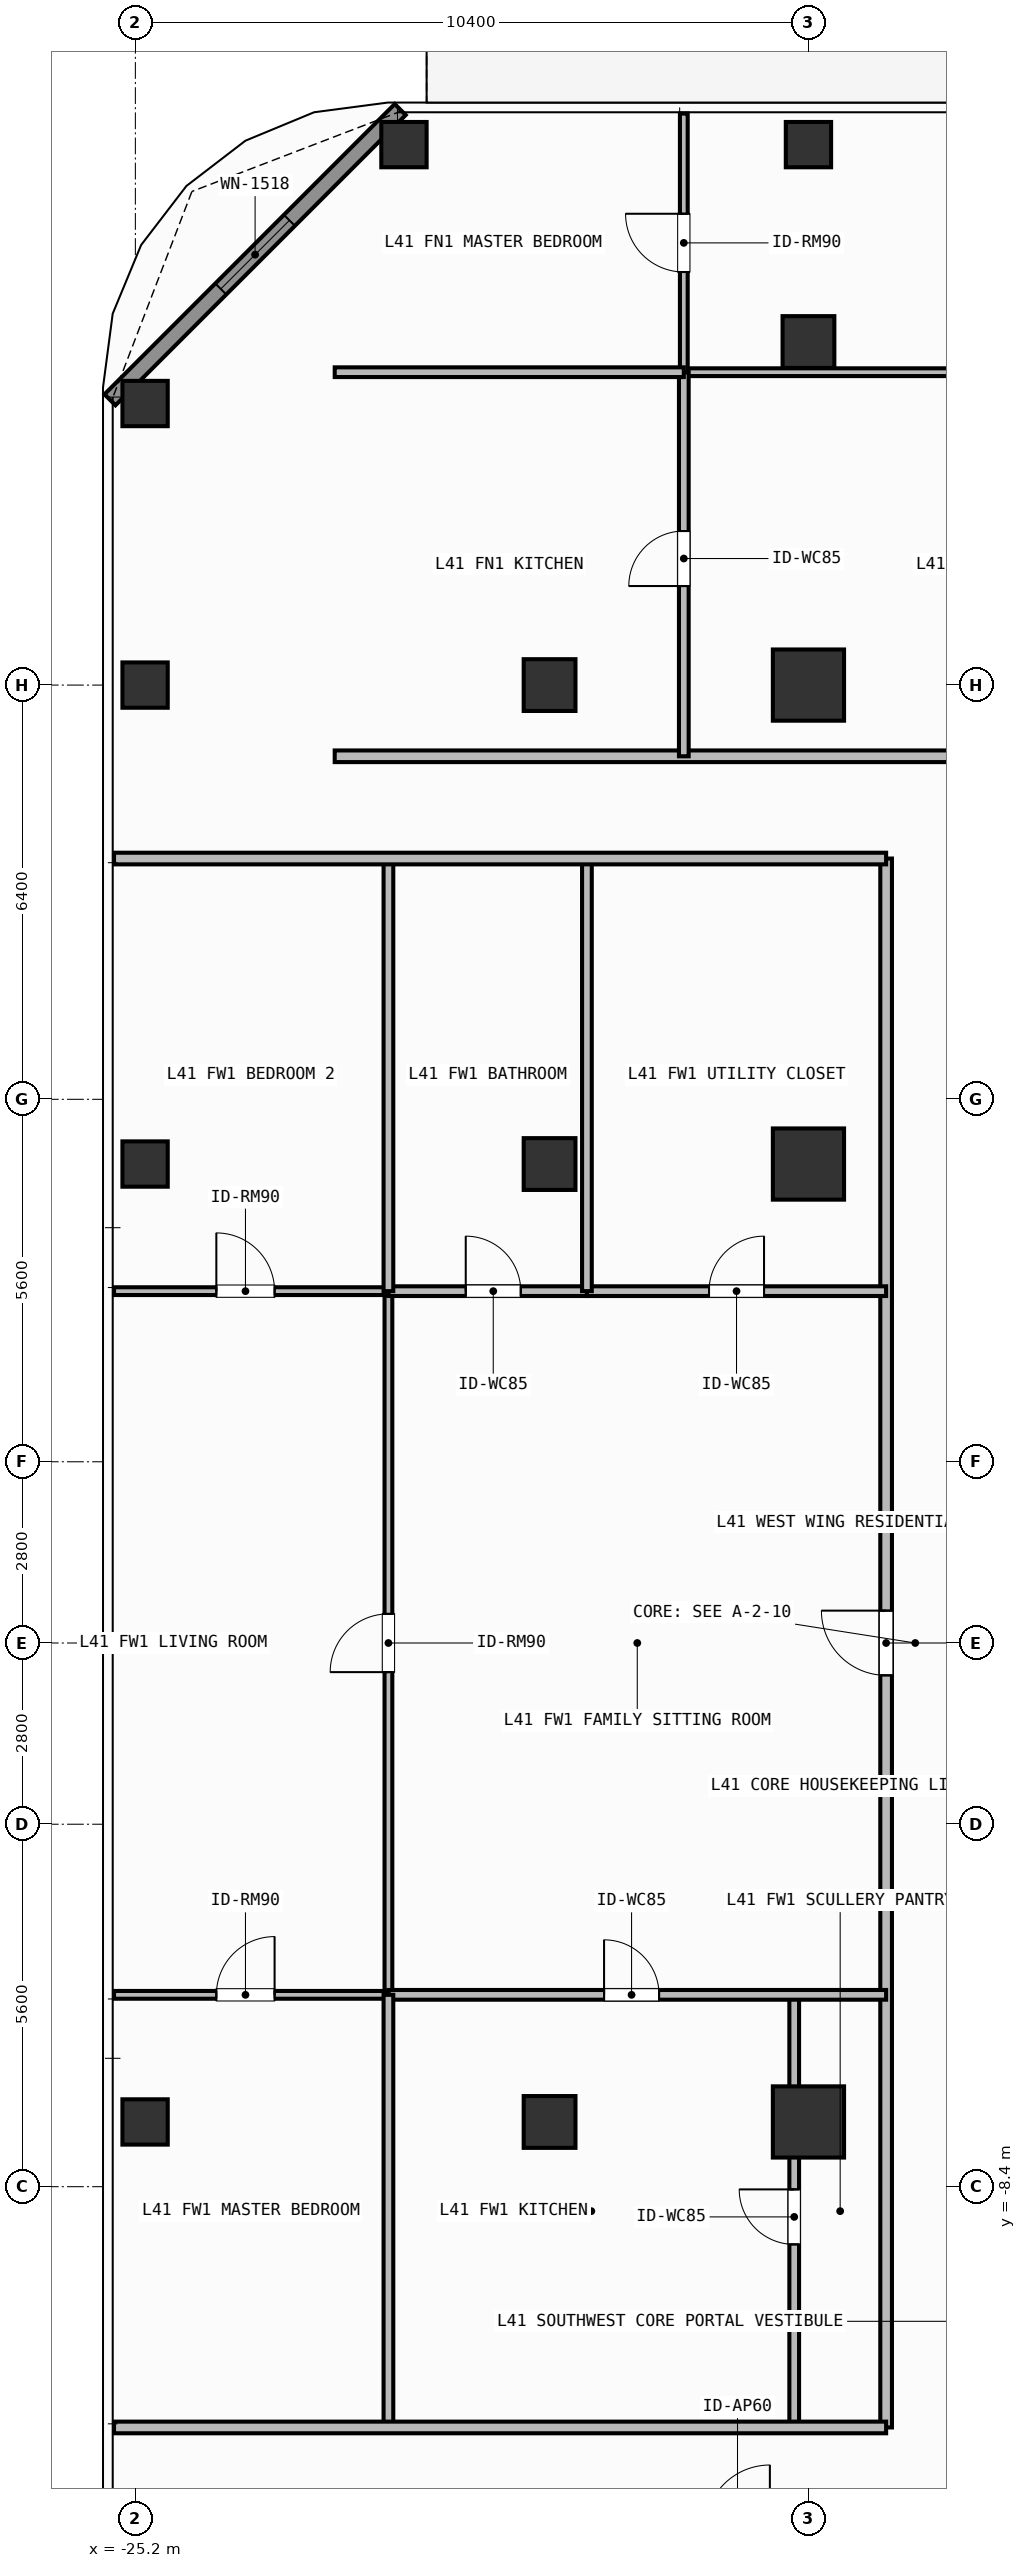
"""IFC4 building model, lengths in metres.
Left out: names, types, materials, properties, quantities, classifications, styles, units other than length and angle.
Written with IfcOpenShell. Run it as: python <this file> out.ifc"""

import sys

from ifc_helpers import new_model, si_unit, direction, frame, frame_2d, origin, origin_2d, place, context, subcontext, project, spatial, rectangle, hollow_rectangle, extrude, element, fill, save


model = new_model("IFC4")
c1 = context("Model", 3, precision=1e-05, world=origin(), true_north=direction((0.0, 1.0)))
c2 = subcontext(c1, "Body", "Model", "MODEL_VIEW")
j1 = project(units=[si_unit("LENGTHUNIT", "METRE"), si_unit("PLANEANGLEUNIT", "RADIAN")], contexts=[c1])
p1 = place(None, origin())
s1 = spatial("IfcSite", under=j1, at=p1, CompositionType="ELEMENT")
p2 = place(p1, origin())
s2 = spatial("IfcBuilding", under=s1, at=p2, CompositionType="ELEMENT")
p3 = place(p2, frame((0.0, 0.0, 168.0)))
s3 = spatial("IfcBuildingStorey", under=s2, at=p3, CompositionType="ELEMENT", Elevation=168.0)
for number, where, z_axis, x_axis in (
    (1, (-14.8, 14.8, 0.0), (0.0, 0.0, 1.0), (1.0, 0.0, 0.0)),
    (2, (-14.8, -7.4, 0.0), (0.0, 0.0, 1.0), (1.0, 0.0, 0.0)),
    (3, (-14.8, 7.4, 0.0), (0.0, 0.0, 1.0), (1.0, 0.0, 0.0)),
):
    element("IfcColumn", number, at=place(p3, frame(where, z_axis=z_axis, x_axis=x_axis)), inside=s3, PredefinedType="COLUMN", context=c2, shape_type="SweptSolid", body=[
        extrude(rectangle(XDim=1.1, YDim=1.1, at=origin_2d()), origin(), (0.0, 0.0, 1.0), 3.9),
    ])
for number, where, z_axis, x_axis in (
    (4, (-18.8, -7.4, 0.0), (0.0, 0.0, 1.0), (1.0, 0.0, 0.0)),
    (5, (-18.8, 7.4, 0.0), (0.0, 0.0, 1.0), (1.0, 0.0, 0.0)),
    (6, (-18.8, 14.8, 0.0), (0.0, 0.0, 1.0), (1.0, 0.0, 0.0)),
    (7, (-14.8, 20.1, 0.0), (0.0, 0.0, 1.0), (1.0, 0.0, 0.0)),
):
    element("IfcColumn", number, at=place(p3, frame(where, z_axis=z_axis, x_axis=x_axis)), inside=s3, PredefinedType="COLUMN", context=c2, shape_type="SweptSolid", body=[
        extrude(hollow_rectangle(XDim=0.8, YDim=0.8, WallThickness=0.036, at=origin_2d()), origin(), (0.0, 0.0, 1.0), 3.9),
    ])
for number, where, z_axis, x_axis in (
    (8, (-21.05, 23.15, 0.0), (0.0, 0.0, 1.0), (1.0, 0.0, 0.0)),
    (9, (-25.05, 19.15, 0.0), (0.0, 0.0, 1.0), (1.0, 0.0, 0.0)),
    (10, (-14.8, 23.15, 0.0), (0.0, 0.0, 1.0), (1.0, 0.0, 0.0)),
    (11, (-25.05, -7.4, 0.0), (0.0, 0.0, 1.0), (1.0, 0.0, 0.0)),
    (12, (-25.05, 7.4, 0.0), (0.0, 0.0, 1.0), (1.0, 0.0, 0.0)),
    (13, (-25.05, 14.8, 0.0), (0.0, 0.0, 1.0), (1.0, 0.0, 0.0)),
):
    element("IfcColumn", number, at=place(p3, frame(where, z_axis=z_axis, x_axis=x_axis)), inside=s3, PredefinedType="COLUMN", context=c2, shape_type="SweptSolid", body=[
        extrude(hollow_rectangle(XDim=0.7, YDim=0.7, WallThickness=0.032, at=origin_2d()), origin(), (0.0, 0.0, 1.0), 3.9),
    ])
p4 = place(p3, frame((-25.592, 19.208, 0.0), z_axis=(0.0, 0.0, 1.0), x_axis=(0.707087534163, 0.707126027686, 0.0)))
e14 = element("IfcWall", 14, at=p4, inside=s3, PredefinedType="SOLIDWALL", context=c2, shape_type="SweptSolid", body=[
    extrude(rectangle(XDim=6.342, YDim=0.24, at=frame_2d((3.171, 0.0))), origin(), (0.0, 0.0, 1.0), 3.68),
])
p5 = place(p4, frame((2.421, 0.0, 0.8)))
e15 = element("IfcOpeningElement", 15, at=p5, cuts=e14, PredefinedType="OPENING", context=c2, shape_type="SweptSolid", body=[
    extrude(rectangle(XDim=1.5, YDim=1.85, at=frame_2d((0.75, 0.925))), frame((0.0, 0.13, 0.0), z_axis=(0.0, -1.0, 0.0), x_axis=(1.0, 0.0, 0.0)), (0.0, 0.0, 1.0), 0.26),
])
p6 = place(p3, frame((-22.12, 13.7, 0.0), z_axis=(0.0, 0.0, 1.0), x_axis=(1.0, 0.0, 0.0)))
e16 = element("IfcWall", 16, at=p6, inside=s3, PredefinedType="PARTITIONING", context=c2, shape_type="SweptSolid", body=[
    extrude(rectangle(XDim=22.646, YDim=0.18, at=frame_2d((11.323, 0.0))), origin(), (0.0, 0.0, 1.0), 3.68),
])
p7 = place(p6, frame((10.554, 0.0, 0.0)))
e17 = element("IfcOpeningElement", 17, at=p7, cuts=e16, PredefinedType="OPENING", context=c2, shape_type="SweptSolid", body=[
    extrude(rectangle(XDim=1.0, YDim=2.2, at=frame_2d((0.5, 1.1))), frame((0.0, 0.1, 0.0), z_axis=(0.0, -1.0, 0.0), x_axis=(1.0, 0.0, 0.0)), (0.0, 0.0, 1.0), 0.2),
])
p8 = place(p3, frame((-16.726, 19.634, 0.0), z_axis=(0.0, 0.0, 1.0), x_axis=(1.0, 0.0, 0.0)))
e18 = element("IfcWall", 18, at=p8, inside=s3, PredefinedType="PARTITIONING", context=c2, shape_type="SweptSolid", body=[
    extrude(rectangle(XDim=11.298, YDim=0.12, at=frame_2d((5.649, 0.0))), origin(), (0.0, 0.0, 1.0), 3.68),
])
p9 = place(p8, frame((5.199, 0.0, 0.0)))
e19 = element("IfcOpeningElement", 19, at=p9, cuts=e18, PredefinedType="OPENING", context=c2, shape_type="SweptSolid", body=[
    extrude(rectangle(XDim=0.9, YDim=2.1, at=frame_2d((0.45, 1.05))), frame((0.0, 0.07, 0.0), z_axis=(0.0, -1.0, 0.0), x_axis=(1.0, 0.0, 0.0)), (0.0, 0.0, 1.0), 0.14),
])
p10 = place(p3, frame((-16.726, 13.7, 0.0), z_axis=(0.0, 0.0, 1.0), x_axis=(0.0, 1.0, 0.0)))
e20 = element("IfcWall", 20, at=p10, inside=s3, PredefinedType="PARTITIONING", context=c2, shape_type="SweptSolid", body=[
    extrude(rectangle(XDim=5.934, YDim=0.15, at=frame_2d((2.967, 0.0))), origin(), (0.0, 0.0, 1.0), 3.68),
])
p11 = place(p10, frame((2.63, 0.0, 0.0)))
e21 = element("IfcOpeningElement", 21, at=p11, cuts=e20, PredefinedType="OPENING", context=c2, shape_type="SweptSolid", body=[
    extrude(rectangle(XDim=0.85, YDim=2.1, at=frame_2d((0.425, 1.05))), frame((0.0, 0.085, 0.0), z_axis=(0.0, -1.0, 0.0), x_axis=(1.0, 0.0, 0.0)), (0.0, 0.0, 1.0), 0.17),
])
p12 = place(p3, frame((-16.726, 19.634, 0.0), z_axis=(0.0, 0.0, 1.0), x_axis=(0.0, 1.0, 0.0)))
e22 = element("IfcWall", 22, at=p12, inside=s3, PredefinedType="PARTITIONING", context=c2, shape_type="SweptSolid", body=[
    extrude(rectangle(XDim=3.996, YDim=0.12, at=frame_2d((1.998, 0.0))), origin(), (0.0, 0.0, 1.0), 3.68),
])
p13 = place(p12, frame((1.548, 0.0, 0.0)))
e23 = element("IfcOpeningElement", 23, at=p13, cuts=e22, PredefinedType="OPENING", context=c2, shape_type="SweptSolid", body=[
    extrude(rectangle(XDim=0.9, YDim=2.1, at=frame_2d((0.45, 1.05))), frame((0.0, 0.07, 0.0), z_axis=(0.0, -1.0, 0.0), x_axis=(1.0, 0.0, 0.0)), (0.0, 0.0, 1.0), 0.14),
])
p14 = place(p3, frame((-13.6, -12.12, 0.0), z_axis=(0.0, 0.0, 1.0), x_axis=(0.0, 1.0, 0.0)))
e24 = element("IfcWall", 24, at=p14, inside=s3, PredefinedType="PARTITIONING", context=c2, shape_type="SweptSolid", body=[
    extrude(rectangle(XDim=24.24, YDim=0.18, at=frame_2d((12.12, 0.0))), origin(), (0.0, 0.0, 1.0), 3.68),
])
p15 = place(p14, frame((11.62, 0.0, 0.0)))
e25 = element("IfcOpeningElement", 25, at=p15, cuts=e24, PredefinedType="OPENING", context=c2, shape_type="SweptSolid", body=[
    extrude(rectangle(XDim=1.0, YDim=2.2, at=frame_2d((0.5, 1.1))), frame((0.0, 0.1, 0.0), z_axis=(0.0, -1.0, 0.0), x_axis=(1.0, 0.0, 0.0)), (0.0, 0.0, 1.0), 0.2),
])
p16 = place(p3, frame((-21.29, -5.436, 0.0), z_axis=(0.0, 0.0, 1.0), x_axis=(0.0, 1.0, 0.0)))
e26 = element("IfcWall", 26, at=p16, inside=s3, PredefinedType="PARTITIONING", context=c2, shape_type="SweptSolid", body=[
    extrude(rectangle(XDim=10.872, YDim=0.12, at=frame_2d((5.436, 0.0))), origin(), (0.0, 0.0, 1.0), 3.68),
])
p17 = place(p16, frame((4.986, 0.0, 0.0)))
e27 = element("IfcOpeningElement", 27, at=p17, cuts=e26, PredefinedType="OPENING", context=c2, shape_type="SweptSolid", body=[
    extrude(rectangle(XDim=0.9, YDim=2.1, at=frame_2d((0.45, 1.05))), frame((0.0, 0.07, 0.0), z_axis=(0.0, -1.0, 0.0), x_axis=(1.0, 0.0, 0.0)), (0.0, 0.0, 1.0), 0.14),
])
p18 = place(p3, frame((-15.02, -12.12, 0.0), z_axis=(0.0, 0.0, 1.0), x_axis=(0.0, 1.0, 0.0)))
e28 = element("IfcWall", 28, at=p18, inside=s3, PredefinedType="PARTITIONING", context=c2, shape_type="SweptSolid", body=[
    extrude(rectangle(XDim=6.684, YDim=0.15, at=frame_2d((3.342, 0.0))), origin(), (0.0, 0.0, 1.0), 3.082),
])
p19 = place(p18, frame((2.828, 0.0, 0.0)))
e29 = element("IfcOpeningElement", 29, at=p19, cuts=e28, PredefinedType="OPENING", context=c2, shape_type="SweptSolid", body=[
    extrude(rectangle(XDim=0.85, YDim=2.1, at=frame_2d((0.425, 1.05))), frame((0.0, 0.085, 0.0), z_axis=(0.0, -1.0, 0.0), x_axis=(1.0, 0.0, 0.0)), (0.0, 0.0, 1.0), 0.17),
])
p20 = place(p3, frame((-21.29, 5.436, 0.0), z_axis=(0.0, 0.0, 1.0), x_axis=(1.0, 0.0, 0.0)))
e30 = element("IfcWall", 30, at=p20, inside=s3, PredefinedType="PARTITIONING", context=c2, shape_type="SweptSolid", body=[
    extrude(rectangle(XDim=3.067, YDim=0.15, at=frame_2d((1.534, 0.0))), origin(), (0.0, 0.0, 1.0), 3.68),
])
p21 = place(p20, frame((1.195, 0.0, 0.0)))
e31 = element("IfcOpeningElement", 31, at=p21, cuts=e30, PredefinedType="OPENING", context=c2, shape_type="SweptSolid", body=[
    extrude(rectangle(XDim=0.85, YDim=2.1, at=frame_2d((0.425, 1.05))), frame((0.0, 0.085, 0.0), z_axis=(0.0, -1.0, 0.0), x_axis=(1.0, 0.0, 0.0)), (0.0, 0.0, 1.0), 0.17),
])
p22 = place(p3, frame((-18.223, 5.436, 0.0), z_axis=(0.0, 0.0, 1.0), x_axis=(1.0, 0.0, 0.0)))
e32 = element("IfcWall", 32, at=p22, inside=s3, PredefinedType="PARTITIONING", context=c2, shape_type="SweptSolid", body=[
    extrude(rectangle(XDim=4.623, YDim=0.15, at=frame_2d((2.312, 0.0))), origin(), (0.0, 0.0, 1.0), 3.68),
])
p23 = place(p22, frame((1.886, 0.0, 0.0)))
e33 = element("IfcOpeningElement", 33, at=p23, cuts=e32, PredefinedType="OPENING", context=c2, shape_type="SweptSolid", body=[
    extrude(rectangle(XDim=0.85, YDim=2.1, at=frame_2d((0.425, 1.05))), frame((0.0, 0.085, 0.0), z_axis=(0.0, -1.0, 0.0), x_axis=(1.0, 0.0, 0.0)), (0.0, 0.0, 1.0), 0.17),
])
p24 = place(p3, frame((-21.29, -5.436, 0.0), z_axis=(0.0, 0.0, 1.0), x_axis=(1.0, 0.0, 0.0)))
e34 = element("IfcWall", 34, at=p24, inside=s3, PredefinedType="PARTITIONING", context=c2, shape_type="SweptSolid", body=[
    extrude(rectangle(XDim=7.69, YDim=0.15, at=frame_2d((3.845, 0.0))), origin(), (0.0, 0.0, 1.0), 3.68),
])
p25 = place(p24, frame((3.332, 0.0, 0.0)))
e35 = element("IfcOpeningElement", 35, at=p25, cuts=e34, PredefinedType="OPENING", context=c2, shape_type="SweptSolid", body=[
    extrude(rectangle(XDim=0.85, YDim=2.1, at=frame_2d((0.425, 1.05))), frame((0.0, 0.085, 0.0), z_axis=(0.0, -1.0, 0.0), x_axis=(1.0, 0.0, 0.0)), (0.0, 0.0, 1.0), 0.17),
])
p26 = place(p3, frame((-25.53, -5.436, 0.0), z_axis=(0.0, 0.0, 1.0), x_axis=(1.0, 0.0, 0.0)))
e36 = element("IfcWall", 36, at=p26, inside=s3, PredefinedType="PARTITIONING", context=c2, shape_type="SweptSolid", body=[
    extrude(rectangle(XDim=4.24, YDim=0.12, at=frame_2d((2.12, 0.0))), origin(), (0.0, 0.0, 1.0), 3.68),
])
p27 = place(p26, frame((1.581, 0.0, 0.0)))
e37 = element("IfcOpeningElement", 37, at=p27, cuts=e36, PredefinedType="OPENING", context=c2, shape_type="SweptSolid", body=[
    extrude(rectangle(XDim=0.9, YDim=2.1, at=frame_2d((0.45, 1.05))), frame((0.0, 0.07, 0.0), z_axis=(0.0, -1.0, 0.0), x_axis=(1.0, 0.0, 0.0)), (0.0, 0.0, 1.0), 0.14),
])
p28 = place(p3, frame((-25.53, 5.436, 0.0), z_axis=(0.0, 0.0, 1.0), x_axis=(1.0, 0.0, 0.0)))
e38 = element("IfcWall", 38, at=p28, inside=s3, PredefinedType="PARTITIONING", context=c2, shape_type="SweptSolid", body=[
    extrude(rectangle(XDim=4.24, YDim=0.12, at=frame_2d((2.12, 0.0))), origin(), (0.0, 0.0, 1.0), 3.68),
])
p29 = place(p28, frame((1.581, 0.0, 0.0)))
e39 = element("IfcOpeningElement", 39, at=p29, cuts=e38, PredefinedType="OPENING", context=c2, shape_type="SweptSolid", body=[
    extrude(rectangle(XDim=0.9, YDim=2.1, at=frame_2d((0.45, 1.05))), frame((0.0, 0.07, 0.0), z_axis=(0.0, -1.0, 0.0), x_axis=(1.0, 0.0, 0.0)), (0.0, 0.0, 1.0), 0.14),
])
p30 = place(p3, frame((-22.12, 19.634, 0.0), z_axis=(0.0, 0.0, 1.0), x_axis=(1.0, 0.0, 0.0)))
e40 = element("IfcWall", 40, at=p30, inside=s3, PredefinedType="PARTITIONING", context=c2, shape_type="SweptSolid", body=[
    extrude(rectangle(XDim=5.394, YDim=0.15, at=frame_2d((2.697, 0.0))), origin(), (0.0, 0.0, 1.0), 3.68),
])
for number, where, z_axis, x_axis in (
    (41, (-18.223, 5.436, 0.0), (0.0, 0.0, 1.0), (0.0, 1.0, 0.0)),
    (42, (-21.29, -12.12, 0.0), (0.0, 0.0, 1.0), (0.0, 1.0, 0.0)),
    (43, (-21.29, 5.436, 0.0), (0.0, 0.0, 1.0), (0.0, 1.0, 0.0)),
):
    element("IfcWall", number, at=place(p3, frame(where, z_axis=z_axis, x_axis=x_axis)), inside=s3, PredefinedType="PARTITIONING", context=c2, shape_type="SweptSolid", body=[
        extrude(rectangle(XDim=6.684, YDim=0.15, at=frame_2d((3.342, 0.0))), origin(), (0.0, 0.0, 1.0), 3.68),
    ])
for number, where, z_axis, x_axis in (
    (44, (-25.53, -12.12, 0.0), (0.0, 0.0, 1.0), (1.0, 0.0, 0.0)),
    (45, (-25.53, 12.12, 0.0), (0.0, 0.0, 1.0), (1.0, 0.0, 0.0)),
):
    element("IfcWall", number, at=place(p3, frame(where, z_axis=z_axis, x_axis=x_axis)), inside=s3, PredefinedType="PARTITIONING", context=c2, shape_type="SweptSolid", body=[
        extrude(rectangle(XDim=11.93, YDim=0.18, at=frame_2d((5.965, 0.0))), origin(), (0.0, 0.0, 1.0), 3.68),
    ])
p31 = place(p5, origin())
e46 = element("IfcWindow", 46, at=p31, inside=s3, PartitioningType="SINGLE_PANEL", PredefinedType="WINDOW", context=c2, shape_type="SweptSolid", body=[
    extrude(rectangle(XDim=1.5, YDim=1.85, at=frame_2d((0.75, 0.925))), frame((0.0, 0.03, 0.0), z_axis=(0.0, -1.0, 0.0), x_axis=(1.0, 0.0, 0.0)), (0.0, 0.0, 1.0), 0.06),
])
fill(e15, e46)
p32 = place(p11, origin())
e47 = element("IfcDoor", 47, at=p32, inside=s3, OperationType="SINGLE_SWING_LEFT", PredefinedType="DOOR", context=c2, shape_type="SweptSolid", body=[
    extrude(rectangle(XDim=0.85, YDim=2.1, at=frame_2d((0.425, 1.05))), frame((0.0, 0.025, 0.0), z_axis=(0.0, -1.0, 0.0), x_axis=(1.0, 0.0, 0.0)), (0.0, 0.0, 1.0), 0.05),
])
fill(e21, e47)
p33 = place(p13, origin())
e48 = element("IfcDoor", 48, at=p33, inside=s3, OperationType="SINGLE_SWING_RIGHT", PredefinedType="DOOR", context=c2, shape_type="SweptSolid", body=[
    extrude(rectangle(XDim=0.9, YDim=2.1, at=frame_2d((0.45, 1.05))), frame((0.0, 0.025, 0.0), z_axis=(0.0, -1.0, 0.0), x_axis=(1.0, 0.0, 0.0)), (0.0, 0.0, 1.0), 0.05),
])
fill(e23, e48)
p34 = place(p15, origin())
e49 = element("IfcDoor", 49, at=p34, inside=s3, OperationType="SINGLE_SWING_RIGHT", PredefinedType="DOOR", context=c2, shape_type="SweptSolid", body=[
    extrude(rectangle(XDim=1.0, YDim=2.2, at=frame_2d((0.5, 1.1))), frame((0.0, 0.025, 0.0), z_axis=(0.0, -1.0, 0.0), x_axis=(1.0, 0.0, 0.0)), (0.0, 0.0, 1.0), 0.05),
])
fill(e25, e49)
p35 = place(p17, origin())
e50 = element("IfcDoor", 50, at=p35, inside=s3, OperationType="SINGLE_SWING_LEFT", PredefinedType="DOOR", context=c2, shape_type="SweptSolid", body=[
    extrude(rectangle(XDim=0.9, YDim=2.1, at=frame_2d((0.45, 1.05))), frame((0.0, 0.025, 0.0), z_axis=(0.0, -1.0, 0.0), x_axis=(1.0, 0.0, 0.0)), (0.0, 0.0, 1.0), 0.05),
])
fill(e27, e50)
p36 = place(p19, origin())
e51 = element("IfcDoor", 51, at=p36, inside=s3, OperationType="SINGLE_SWING_RIGHT", PredefinedType="DOOR", context=c2, shape_type="SweptSolid", body=[
    extrude(rectangle(XDim=0.85, YDim=2.1, at=frame_2d((0.425, 1.05))), frame((0.0, 0.025, 0.0), z_axis=(0.0, -1.0, 0.0), x_axis=(1.0, 0.0, 0.0)), (0.0, 0.0, 1.0), 0.05),
])
fill(e29, e51)
p37 = place(p21, origin())
e52 = element("IfcDoor", 52, at=p37, inside=s3, OperationType="SINGLE_SWING_LEFT", PredefinedType="DOOR", context=c2, shape_type="SweptSolid", body=[
    extrude(rectangle(XDim=0.85, YDim=2.1, at=frame_2d((0.425, 1.05))), frame((0.0, 0.025, 0.0), z_axis=(0.0, -1.0, 0.0), x_axis=(1.0, 0.0, 0.0)), (0.0, 0.0, 1.0), 0.05),
])
fill(e31, e52)
p38 = place(p23, origin())
e53 = element("IfcDoor", 53, at=p38, inside=s3, OperationType="SINGLE_SWING_RIGHT", PredefinedType="DOOR", context=c2, shape_type="SweptSolid", body=[
    extrude(rectangle(XDim=0.85, YDim=2.1, at=frame_2d((0.425, 1.05))), frame((0.0, 0.025, 0.0), z_axis=(0.0, -1.0, 0.0), x_axis=(1.0, 0.0, 0.0)), (0.0, 0.0, 1.0), 0.05),
])
fill(e33, e53)
p39 = place(p25, origin())
e54 = element("IfcDoor", 54, at=p39, inside=s3, OperationType="SINGLE_SWING_LEFT", PredefinedType="DOOR", context=c2, shape_type="SweptSolid", body=[
    extrude(rectangle(XDim=0.85, YDim=2.1, at=frame_2d((0.425, 1.05))), frame((0.0, 0.025, 0.0), z_axis=(0.0, -1.0, 0.0), x_axis=(1.0, 0.0, 0.0)), (0.0, 0.0, 1.0), 0.05),
])
fill(e35, e54)
p40 = place(p27, origin())
e55 = element("IfcDoor", 55, at=p40, inside=s3, OperationType="SINGLE_SWING_RIGHT", PredefinedType="DOOR", context=c2, shape_type="SweptSolid", body=[
    extrude(rectangle(XDim=0.9, YDim=2.1, at=frame_2d((0.45, 1.05))), frame((0.0, 0.025, 0.0), z_axis=(0.0, -1.0, 0.0), x_axis=(1.0, 0.0, 0.0)), (0.0, 0.0, 1.0), 0.05),
])
fill(e37, e55)
p41 = place(p29, origin())
e56 = element("IfcDoor", 56, at=p41, inside=s3, OperationType="SINGLE_SWING_LEFT", PredefinedType="DOOR", context=c2, shape_type="SweptSolid", body=[
    extrude(rectangle(XDim=0.9, YDim=2.1, at=frame_2d((0.45, 1.05))), frame((0.0, 0.025, 0.0), z_axis=(0.0, -1.0, 0.0), x_axis=(1.0, 0.0, 0.0)), (0.0, 0.0, 1.0), 0.05),
])
fill(e39, e56)
save(model, sys.argv[1])
